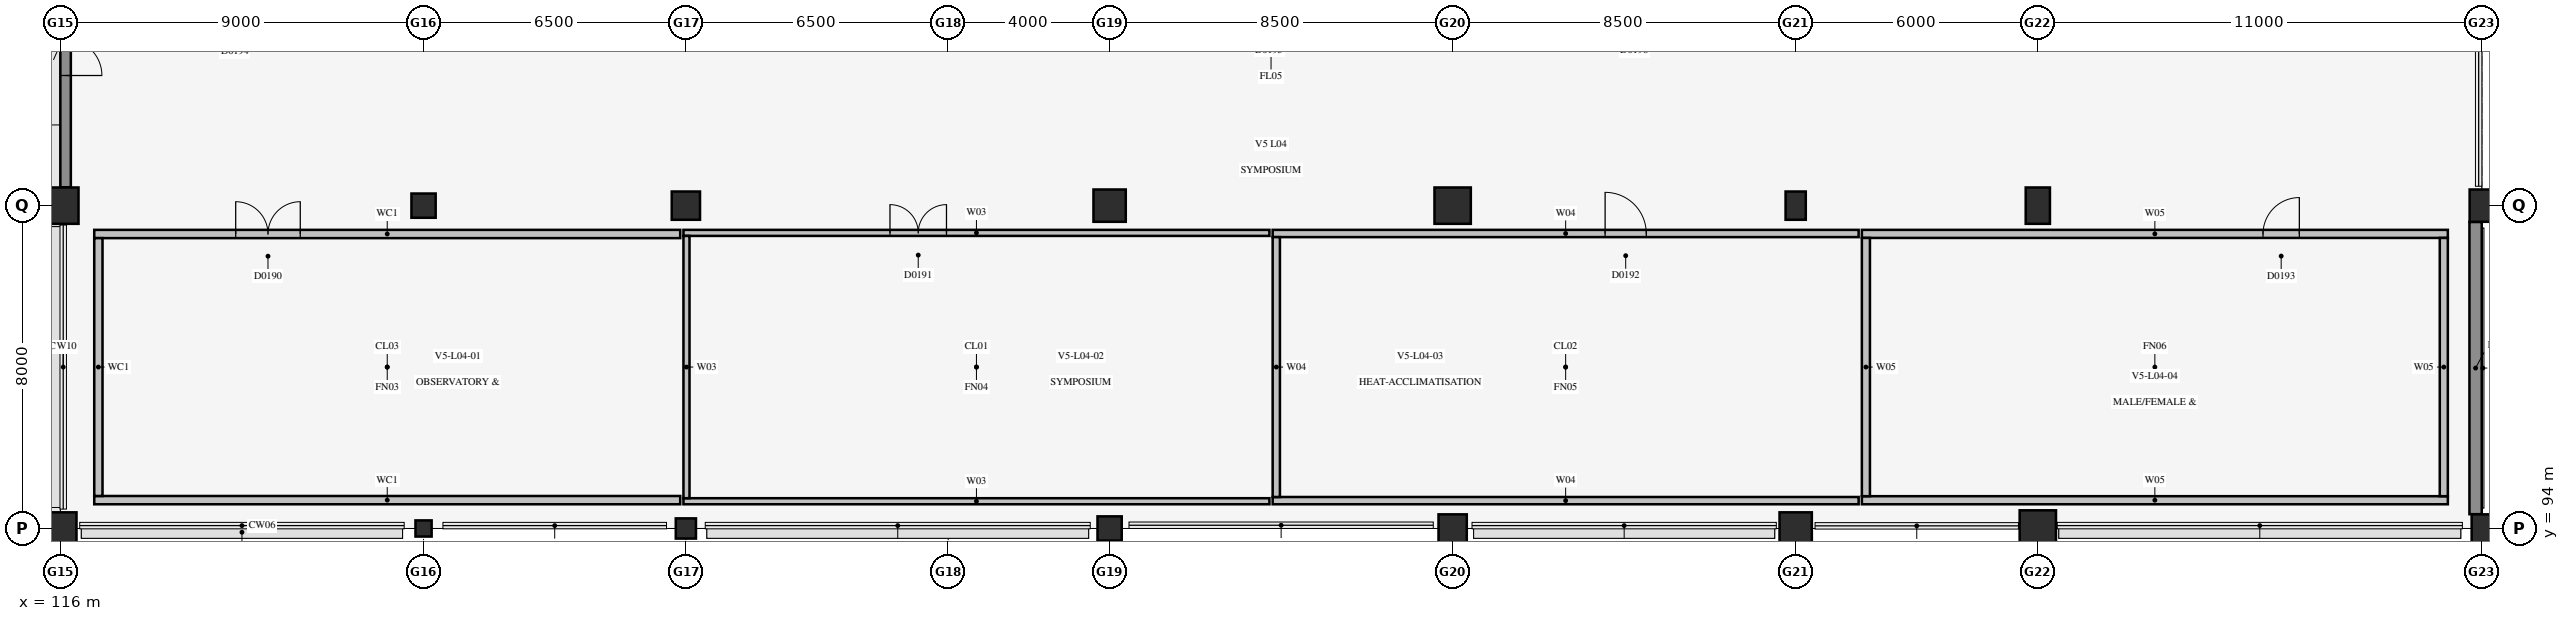
"""IFC4 building model, lengths in metres.
Left out: names, types, materials, properties, quantities, classifications, styles, units other than length and angle.
Written with IfcOpenShell. Run it as: python <this file> out.ifc"""

import sys

from ifc_helpers import new_model, si_unit, direction, frame, frame_2d, origin, origin_2d, place, context, subcontext, project, spatial, rectangle, circle, extrude, element, fill, save


model = new_model("IFC4")
c1 = context("Model", 3, precision=1e-05, world=origin(), true_north=direction((0.0, 1.0)))
c2 = subcontext(c1, "Body", "Model", "MODEL_VIEW")
j1 = project(units=[si_unit("LENGTHUNIT", "METRE"), si_unit("PLANEANGLEUNIT", "RADIAN")], contexts=[c1])
p1 = place(None, origin())
s1 = spatial("IfcSite", under=j1, at=p1, CompositionType="ELEMENT")
p2 = place(p1, origin())
s2 = spatial("IfcBuilding", under=s1, at=p2, CompositionType="ELEMENT")
p3 = place(p2, frame((0.0, 0.0, 19.0)))
s3 = spatial("IfcBuildingStorey", under=s2, at=p3, CompositionType="ELEMENT", Elevation=19.0)
p4 = place(p3, frame((116.0, 94.0, 0.0), z_axis=(0.0, 0.0, 1.0), x_axis=(1.0, 0.0, 0.0)))
e1 = element("IfcColumn", 1, at=p4, inside=s3, PredefinedType="COLUMN", context=c2, shape_type="SweptSolid", body=[
    extrude(circle(Radius=0.4, at=origin_2d()), origin(), (0.0, 0.0, 1.0), 3.85),
])
p5 = place(p3, frame((116.0, 102.0, 0.0), z_axis=(0.0, 0.0, 1.0), x_axis=(1.0, 0.0, 0.0)))
e2 = element("IfcColumn", 2, at=p5, inside=s3, PredefinedType="COLUMN", context=c2, shape_type="SweptSolid", body=[
    extrude(circle(Radius=0.45, at=origin_2d()), origin(), (0.0, 0.0, 1.0), 3.85),
])
p6 = place(p3, frame((125.0, 94.0, 0.0), z_axis=(0.0, 0.0, 1.0), x_axis=(1.0, 0.0, 0.0)))
e3 = element("IfcColumn", 3, at=p6, inside=s3, PredefinedType="COLUMN", context=c2, shape_type="SweptSolid", body=[
    extrude(rectangle(XDim=0.4, YDim=0.4, at=origin_2d()), origin(), (0.0, 0.0, 1.0), 3.85),
])
p7 = place(p3, frame((125.0, 102.0, 0.0), z_axis=(0.0, 0.0, 1.0), x_axis=(1.0, 0.0, 0.0)))
e4 = element("IfcColumn", 4, at=p7, inside=s3, PredefinedType="COLUMN", context=c2, shape_type="SweptSolid", body=[
    extrude(rectangle(XDim=0.6, YDim=0.6, at=origin_2d()), origin(), (0.0, 0.0, 1.0), 3.85),
])
p8 = place(p3, frame((131.5, 94.0, 0.0), z_axis=(0.0, 0.0, 1.0), x_axis=(1.0, 0.0, 0.0)))
e5 = element("IfcColumn", 5, at=p8, inside=s3, PredefinedType="COLUMN", context=c2, shape_type="SweptSolid", body=[
    extrude(rectangle(XDim=0.5, YDim=0.5, at=origin_2d()), origin(), (0.0, 0.0, 1.0), 3.85),
])
p9 = place(p3, frame((131.5, 102.0, 0.0), z_axis=(0.0, 0.0, 1.0), x_axis=(1.0, 0.0, 0.0)))
e6 = element("IfcColumn", 6, at=p9, inside=s3, PredefinedType="COLUMN", context=c2, shape_type="SweptSolid", body=[
    extrude(rectangle(XDim=0.7, YDim=0.7, at=origin_2d()), origin(), (0.0, 0.0, 1.0), 3.85),
])
p10 = place(p3, frame((142.0, 94.0, 0.0), z_axis=(0.0, 0.0, 1.0), x_axis=(1.0, 0.0, 0.0)))
e7 = element("IfcColumn", 7, at=p10, inside=s3, PredefinedType="COLUMN", context=c2, shape_type="SweptSolid", body=[
    extrude(rectangle(XDim=0.6, YDim=0.6, at=origin_2d()), origin(), (0.0, 0.0, 1.0), 3.85),
])
p11 = place(p3, frame((142.0, 102.0, 0.0), z_axis=(0.0, 0.0, 1.0), x_axis=(1.0, 0.0, 0.0)))
e8 = element("IfcColumn", 8, at=p11, inside=s3, PredefinedType="COLUMN", context=c2, shape_type="SweptSolid", body=[
    extrude(rectangle(XDim=0.8, YDim=0.8, at=origin_2d()), origin(), (0.0, 0.0, 1.0), 3.85),
])
p12 = place(p3, frame((150.5, 94.0, 0.0), z_axis=(0.0, 0.0, 1.0), x_axis=(1.0, 0.0, 0.0)))
e9 = element("IfcColumn", 9, at=p12, inside=s3, PredefinedType="COLUMN", context=c2, shape_type="SweptSolid", body=[
    extrude(rectangle(XDim=0.7, YDim=0.7, at=origin_2d()), origin(), (0.0, 0.0, 1.0), 3.85),
])
p13 = place(p3, frame((150.5, 102.0, 0.0), z_axis=(0.0, 0.0, 1.0), x_axis=(1.0, 0.0, 0.0)))
e10 = element("IfcColumn", 10, at=p13, inside=s3, PredefinedType="COLUMN", context=c2, shape_type="SweptSolid", body=[
    extrude(rectangle(XDim=0.9, YDim=0.9, at=origin_2d()), origin(), (0.0, 0.0, 1.0), 3.85),
])
p14 = place(p3, frame((159.0, 94.0, 0.0), z_axis=(0.0, 0.0, 1.0), x_axis=(1.0, 0.0, 0.0)))
e11 = element("IfcColumn", 11, at=p14, inside=s3, PredefinedType="COLUMN", context=c2, shape_type="SweptSolid", body=[
    extrude(rectangle(XDim=0.8, YDim=0.8, at=origin_2d()), origin(), (0.0, 0.0, 1.0), 3.85),
])
p15 = place(p3, frame((159.0, 102.0, 0.0), z_axis=(0.0, 0.0, 1.0), x_axis=(1.0, 0.0, 0.0)))
e12 = element("IfcColumn", 12, at=p15, inside=s3, PredefinedType="COLUMN", context=c2, shape_type="SweptSolid", body=[
    extrude(rectangle(XDim=0.5, YDim=0.7, at=origin_2d()), origin(), (0.0, 0.0, 1.0), 3.85),
])
p16 = place(p3, frame((165.0, 94.0, 0.0), z_axis=(0.0, 0.0, 1.0), x_axis=(1.0, 0.0, 0.0)))
e13 = element("IfcColumn", 13, at=p16, inside=s3, PredefinedType="COLUMN", context=c2, shape_type="SweptSolid", body=[
    extrude(rectangle(XDim=0.9, YDim=0.9, at=origin_2d()), origin(), (0.0, 0.0, 1.0), 3.85),
])
p17 = place(p3, frame((165.0, 102.0, 0.0), z_axis=(0.0, 0.0, 1.0), x_axis=(1.0, 0.0, 0.0)))
e14 = element("IfcColumn", 14, at=p17, inside=s3, PredefinedType="COLUMN", context=c2, shape_type="SweptSolid", body=[
    extrude(rectangle(XDim=0.6, YDim=0.9, at=origin_2d()), origin(), (0.0, 0.0, 1.0), 3.85),
])
p18 = place(p3, frame((176.0, 94.0, 0.0), z_axis=(0.0, 0.0, 1.0), x_axis=(1.0, 0.0, 0.0)))
e15 = element("IfcColumn", 15, at=p18, inside=s3, PredefinedType="COLUMN", context=c2, shape_type="SweptSolid", body=[
    extrude(rectangle(XDim=0.5, YDim=0.7, at=origin_2d()), origin(), (0.0, 0.0, 1.0), 3.85),
])
p19 = place(p3, frame((176.0, 102.0, 0.0), z_axis=(0.0, 0.0, 1.0), x_axis=(1.0, 0.0, 0.0)))
e16 = element("IfcColumn", 16, at=p19, inside=s3, PredefinedType="COLUMN", context=c2, shape_type="SweptSolid", body=[
    extrude(rectangle(XDim=0.6, YDim=0.8, at=origin_2d()), origin(), (0.0, 0.0, 1.0), 3.85),
])
p20 = place(p3, frame((116.84, 94.702, 0.0), z_axis=(0.0, 0.0, 1.0), x_axis=(1.0, 0.0, 0.0)))
e17 = element("IfcWall", 17, at=p20, inside=s3, PredefinedType="SOLIDWALL", context=c2, shape_type="SweptSolid", body=[
    extrude(rectangle(XDim=14.52, YDim=0.205, at=frame_2d((7.26, 0.0))), origin(), (0.0, 0.0, 1.0), 3.835),
])
p21 = place(p3, frame((116.84, 101.298, 0.0), z_axis=(0.0, 0.0, 1.0), x_axis=(1.0, 0.0, 0.0)))
e18 = element("IfcWall", 18, at=p21, inside=s3, PredefinedType="SOLIDWALL", context=c2, shape_type="SweptSolid", body=[
    extrude(rectangle(XDim=14.52, YDim=0.205, at=frame_2d((7.26, 0.0))), origin(), (0.0, 0.0, 1.0), 3.835),
])
p22 = place(p21, frame((3.505, 0.0, 0.0)))
e19 = element("IfcOpeningElement", 19, at=p22, cuts=e18, PredefinedType="OPENING", context=c2, shape_type="SweptSolid", body=[
    extrude(rectangle(XDim=1.6, YDim=2.2, at=frame_2d((0.8, 1.1))), frame((0.0, 0.115, 0.0), z_axis=(0.0, -1.0, 0.0), x_axis=(1.0, 0.0, 0.0)), (0.0, 0.0, 1.0), 0.229),
])
p23 = place(p3, frame((116.942, 94.805, 0.0), z_axis=(0.0, 0.0, 1.0), x_axis=(0.0, 1.0, 0.0)))
e20 = element("IfcWall", 20, at=p23, inside=s3, PredefinedType="SOLIDWALL", context=c2, shape_type="SweptSolid", body=[
    extrude(rectangle(XDim=6.39, YDim=0.205, at=frame_2d((3.195, 0.0))), origin(), (0.0, 0.0, 1.0), 3.835),
])
p24 = place(p3, frame((131.44, 94.675, 0.0), z_axis=(0.0, 0.0, 1.0), x_axis=(1.0, 0.0, 0.0)))
e21 = element("IfcWall", 21, at=p24, inside=s3, PredefinedType="PARTITIONING", context=c2, shape_type="SweptSolid", body=[
    extrude(rectangle(XDim=14.52, YDim=0.15, at=frame_2d((7.26, 0.0))), origin(), (0.0, 0.0, 1.0), 3.835),
])
p25 = place(p3, frame((131.44, 101.325, 0.0), z_axis=(0.0, 0.0, 1.0), x_axis=(1.0, 0.0, 0.0)))
e22 = element("IfcWall", 22, at=p25, inside=s3, PredefinedType="PARTITIONING", context=c2, shape_type="SweptSolid", body=[
    extrude(rectangle(XDim=14.52, YDim=0.15, at=frame_2d((7.26, 0.0))), origin(), (0.0, 0.0, 1.0), 3.835),
])
p26 = place(p25, frame((5.118, 0.0, 0.0)))
e23 = element("IfcOpeningElement", 23, at=p26, cuts=e22, PredefinedType="OPENING", context=c2, shape_type="SweptSolid", body=[
    extrude(rectangle(XDim=1.4, YDim=2.2, at=frame_2d((0.7, 1.1))), frame((0.0, 0.087, 0.0), z_axis=(0.0, -1.0, 0.0), x_axis=(1.0, 0.0, 0.0)), (0.0, 0.0, 1.0), 0.174),
])
p27 = place(p3, frame((131.515, 94.75, 0.0), z_axis=(0.0, 0.0, 1.0), x_axis=(0.0, 1.0, 0.0)))
e24 = element("IfcWall", 24, at=p27, inside=s3, PredefinedType="PARTITIONING", context=c2, shape_type="SweptSolid", body=[
    extrude(rectangle(XDim=6.5, YDim=0.15, at=frame_2d((3.25, 0.0))), origin(), (0.0, 0.0, 1.0), 3.203),
])
p28 = place(p3, frame((146.04, 94.69, 0.0), z_axis=(0.0, 0.0, 1.0), x_axis=(1.0, 0.0, 0.0)))
e25 = element("IfcWall", 25, at=p28, inside=s3, PredefinedType="PARTITIONING", context=c2, shape_type="SweptSolid", body=[
    extrude(rectangle(XDim=14.52, YDim=0.18, at=frame_2d((7.26, 0.0))), origin(), (0.0, 0.0, 1.0), 3.835),
])
p29 = place(p3, frame((146.04, 101.31, 0.0), z_axis=(0.0, 0.0, 1.0), x_axis=(1.0, 0.0, 0.0)))
e26 = element("IfcWall", 26, at=p29, inside=s3, PredefinedType="PARTITIONING", context=c2, shape_type="SweptSolid", body=[
    extrude(rectangle(XDim=14.52, YDim=0.18, at=frame_2d((7.26, 0.0))), origin(), (0.0, 0.0, 1.0), 3.835),
])
p30 = place(p29, frame((8.238, 0.0, 0.0)))
e27 = element("IfcOpeningElement", 27, at=p30, cuts=e26, PredefinedType="OPENING", context=c2, shape_type="SweptSolid", body=[
    extrude(rectangle(XDim=1.02, YDim=2.2, at=frame_2d((0.51, 1.1))), frame((0.0, 0.102, 0.0), z_axis=(0.0, -1.0, 0.0), x_axis=(1.0, 0.0, 0.0)), (0.0, 0.0, 1.0), 0.204),
])
p31 = place(p3, frame((146.13, 94.78, 0.0), z_axis=(0.0, 0.0, 1.0), x_axis=(0.0, 1.0, 0.0)))
e28 = element("IfcWall", 28, at=p31, inside=s3, PredefinedType="PARTITIONING", context=c2, shape_type="SweptSolid", body=[
    extrude(rectangle(XDim=6.44, YDim=0.18, at=frame_2d((3.22, 0.0))), origin(), (0.0, 0.0, 1.0), 3.835),
])
p32 = place(p3, frame((160.64, 94.7, 0.0), z_axis=(0.0, 0.0, 1.0), x_axis=(1.0, 0.0, 0.0)))
e29 = element("IfcWall", 29, at=p32, inside=s3, PredefinedType="PLUMBINGWALL", context=c2, shape_type="SweptSolid", body=[
    extrude(rectangle(XDim=14.52, YDim=0.2, at=frame_2d((7.26, 0.0))), origin(), (0.0, 0.0, 1.0), 3.835),
])
p33 = place(p3, frame((160.64, 101.3, 0.0), z_axis=(0.0, 0.0, 1.0), x_axis=(1.0, 0.0, 0.0)))
e30 = element("IfcWall", 30, at=p33, inside=s3, PredefinedType="PLUMBINGWALL", context=c2, shape_type="SweptSolid", body=[
    extrude(rectangle(XDim=14.52, YDim=0.2, at=frame_2d((7.26, 0.0))), origin(), (0.0, 0.0, 1.0), 3.835),
])
p34 = place(p33, frame((9.94, 0.0, 0.0)))
e31 = element("IfcOpeningElement", 31, at=p34, cuts=e30, PredefinedType="OPENING", context=c2, shape_type="SweptSolid", body=[
    extrude(rectangle(XDim=0.9, YDim=2.1, at=frame_2d((0.45, 1.05))), frame((0.0, 0.112, 0.0), z_axis=(0.0, -1.0, 0.0), x_axis=(1.0, 0.0, 0.0)), (0.0, 0.0, 1.0), 0.224),
])
for number, where, z_axis, x_axis in (
    (32, (175.06, 94.8, 0.0), (0.0, 0.0, 1.0), (0.0, 1.0, 0.0)),
    (33, (160.74, 94.8, 0.0), (0.0, 0.0, 1.0), (0.0, 1.0, 0.0)),
):
    element("IfcWall", number, at=place(p3, frame(where, z_axis=z_axis, x_axis=x_axis)), inside=s3, PredefinedType="PLUMBINGWALL", context=c2, shape_type="SweptSolid", body=[
        extrude(rectangle(XDim=6.4, YDim=0.2, at=frame_2d((3.2, 0.0))), origin(), (0.0, 0.0, 1.0), 3.835),
    ])
p35 = place(p3, frame((116.13, 102.454, 0.0), z_axis=(0.0, 0.0, 1.0), x_axis=(0.0, 1.0, 0.0)))
e34 = element("IfcWall", 34, at=p35, inside=s3, PredefinedType="SOLIDWALL", context=c2, shape_type="SweptSolid", body=[
    extrude(rectangle(XDim=7.342, YDim=0.26, at=frame_2d((3.671, 0.0))), origin(), (0.0, 0.0, 1.0), 3.208),
])
p36 = place(p35, frame((2.771, 0.0, 0.0)))
e35 = element("IfcOpeningElement", 35, at=p36, cuts=e34, PredefinedType="OPENING", context=c2, shape_type="SweptSolid", body=[
    extrude(rectangle(XDim=1.8, YDim=2.4, at=frame_2d((0.9, 1.2))), frame((0.0, 0.142, 0.0), z_axis=(0.0, -1.0, 0.0), x_axis=(1.0, 0.0, 0.0)), (0.0, 0.0, 1.0), 0.284),
])
p37 = place(p3, frame((175.847, 94.354, 0.0), z_axis=(0.0, 0.0, 1.0), x_axis=(0.0, 1.0, 0.0)))
e36 = element("IfcWall", 36, at=p37, inside=s3, PredefinedType="SOLIDWALL", context=c2, shape_type="SweptSolid", body=[
    extrude(rectangle(XDim=7.242, YDim=0.305, at=frame_2d((3.621, 0.0))), origin(), (0.0, 0.0, 1.0), 3.36),
])
p38 = place(p22, frame((1.6, 0.0, 0.0), z_axis=(0.0, 0.0, 1.0), x_axis=(-1.0, 0.0, 0.0)))
e37 = element("IfcDoor", 37, at=p38, inside=s3, OperationType="DOUBLE_DOOR_SINGLE_SWING", PredefinedType="DOOR", context=c2, shape_type="SweptSolid", body=[
    extrude(rectangle(XDim=1.6, YDim=2.2, at=frame_2d((0.8, 1.1))), frame((0.0, 0.025, 0.0), z_axis=(0.0, -1.0, 0.0), x_axis=(1.0, 0.0, 0.0)), (0.0, 0.0, 1.0), 0.05),
])
fill(e19, e37)
p39 = place(p26, frame((1.4, 0.0, 0.0), z_axis=(0.0, 0.0, 1.0), x_axis=(-1.0, 0.0, 0.0)))
e38 = element("IfcDoor", 38, at=p39, inside=s3, OperationType="DOUBLE_DOOR_SINGLE_SWING", PredefinedType="DOOR", context=c2, shape_type="SweptSolid", body=[
    extrude(rectangle(XDim=1.4, YDim=2.2, at=frame_2d((0.7, 1.1))), frame((0.0, 0.025, 0.0), z_axis=(0.0, -1.0, 0.0), x_axis=(1.0, 0.0, 0.0)), (0.0, 0.0, 1.0), 0.05),
])
fill(e23, e38)
p40 = place(p30, frame((1.02, 0.0, 0.0), z_axis=(0.0, 0.0, 1.0), x_axis=(-1.0, 0.0, 0.0)))
e39 = element("IfcDoor", 39, at=p40, inside=s3, OperationType="SINGLE_SWING_LEFT", PredefinedType="DOOR", context=c2, shape_type="SweptSolid", body=[
    extrude(rectangle(XDim=1.02, YDim=2.2, at=frame_2d((0.51, 1.1))), frame((0.0, 0.025, 0.0), z_axis=(0.0, -1.0, 0.0), x_axis=(1.0, 0.0, 0.0)), (0.0, 0.0, 1.0), 0.05),
])
fill(e27, e39)
p41 = place(p34, frame((0.9, 0.0, 0.0), z_axis=(0.0, 0.0, 1.0), x_axis=(-1.0, 0.0, 0.0)))
e40 = element("IfcDoor", 40, at=p41, inside=s3, OperationType="SINGLE_SWING_RIGHT", PredefinedType="DOOR", context=c2, shape_type="SweptSolid", body=[
    extrude(rectangle(XDim=0.9, YDim=2.1, at=frame_2d((0.45, 1.05))), frame((0.0, 0.025, 0.0), z_axis=(0.0, -1.0, 0.0), x_axis=(1.0, 0.0, 0.0)), (0.0, 0.0, 1.0), 0.05),
])
fill(e31, e40)
p42 = place(p36, origin())
e41 = element("IfcDoor", 41, at=p42, inside=s3, OperationType="DOUBLE_DOOR_SINGLE_SWING", PredefinedType="DOOR", context=c2, shape_type="SweptSolid", body=[
    extrude(rectangle(XDim=1.8, YDim=2.4, at=frame_2d((0.9, 1.2))), frame((0.0, 0.025, 0.0), z_axis=(0.0, -1.0, 0.0), x_axis=(1.0, 0.0, 0.0)), (0.0, 0.0, 1.0), 0.05),
])
fill(e35, e41)
save(model, sys.argv[1])
